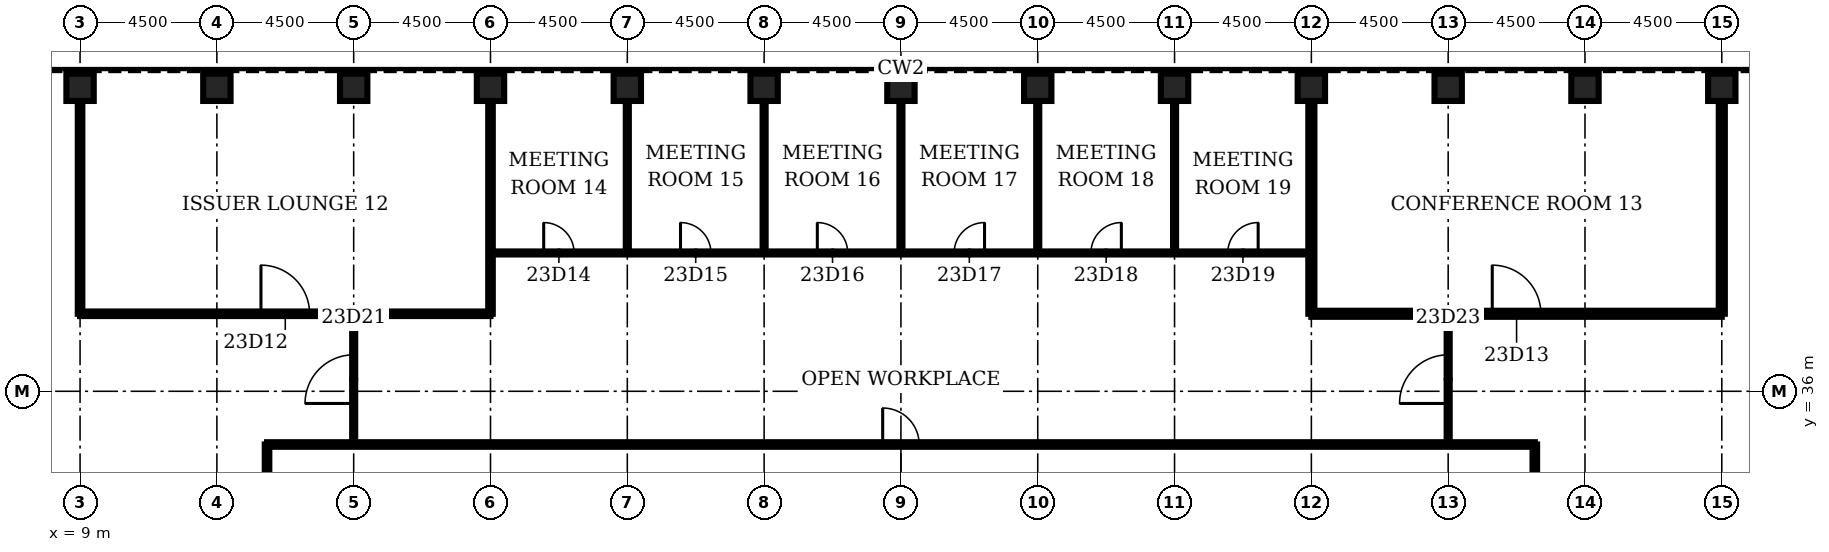
"""IFC4 building model, lengths in metres.
Left out: names, types, materials, properties, quantities, classifications, styles, units other than length and angle.
Written with IfcOpenShell. Run it as: python <this file> out.ifc"""

import sys

from ifc_helpers import new_model, si_unit, direction, frame, frame_2d, origin, origin_2d, place, context, subcontext, project, spatial, rectangle, hollow_rectangle, extrude, element, fill, save


model = new_model("IFC4")
c1 = context("Model", 3, precision=1e-05, world=origin(), true_north=direction((0.0, 1.0)))
c2 = subcontext(c1, "Body", "Model", "MODEL_VIEW")
j1 = project(units=[si_unit("LENGTHUNIT", "METRE"), si_unit("PLANEANGLEUNIT", "RADIAN")], contexts=[c1])
p1 = place(None, origin())
s1 = spatial("IfcSite", under=j1, at=p1, CompositionType="ELEMENT")
p2 = place(p1, origin())
s2 = spatial("IfcBuilding", under=s1, at=p2, CompositionType="ELEMENT")
p3 = place(p2, frame((0.0, 0.0, 108.9)))
s3 = spatial("IfcBuildingStorey", under=s2, at=p3, CompositionType="ELEMENT", Elevation=108.9)
for number, where, z_axis, x_axis in (
    (1, (63.0, 46.0, 0.0), (0.0, 0.0, 1.0), (0.0, 1.0, 0.0)),
    (2, (58.5, 46.0, 0.0), (0.0, 0.0, 1.0), (0.0, 1.0, 0.0)),
    (3, (54.0, 46.0, 0.0), (0.0, 0.0, 1.0), (0.0, 1.0, 0.0)),
    (4, (49.5, 46.0, 0.0), (0.0, 0.0, 1.0), (0.0, 1.0, 0.0)),
    (5, (45.0, 46.0, 0.0), (0.0, 0.0, 1.0), (0.0, 1.0, 0.0)),
    (6, (40.5, 46.0, 0.0), (0.0, 0.0, 1.0), (0.0, 1.0, 0.0)),
    (7, (36.0, 46.0, 0.0), (0.0, 0.0, 1.0), (0.0, 1.0, 0.0)),
    (8, (31.5, 46.0, 0.0), (0.0, 0.0, 1.0), (0.0, 1.0, 0.0)),
    (9, (27.0, 46.0, 0.0), (0.0, 0.0, 1.0), (0.0, 1.0, 0.0)),
    (10, (22.5, 46.0, 0.0), (0.0, 0.0, 1.0), (0.0, 1.0, 0.0)),
    (11, (18.0, 46.0, 0.0), (0.0, 0.0, 1.0), (0.0, 1.0, 0.0)),
    (12, (13.5, 46.0, 0.0), (0.0, 0.0, 1.0), (0.0, 1.0, 0.0)),
    (13, (9.0, 46.0, 0.0), (0.0, 0.0, 1.0), (0.0, 1.0, 0.0)),
):
    element("IfcColumn", number, at=place(p3, frame(where, z_axis=z_axis, x_axis=x_axis)), inside=s3, PredefinedType="COLUMN", context=c2, shape_type="SweptSolid", body=[
        extrude(hollow_rectangle(XDim=0.9, YDim=0.9, WallThickness=0.11, at=origin_2d()), origin(), (0.0, 0.0, 1.0), 4.2),
    ])
p4 = place(p3, frame((15.15, 34.25, 0.0), z_axis=(0.0, 0.0, 1.0), x_axis=(1.0, 0.0, 0.0)))
e14 = element("IfcWall", 14, at=p4, inside=s3, PredefinedType="PARTITIONING", context=c2, shape_type="SweptSolid", body=[
    extrude(rectangle(XDim=41.7, YDim=0.15, at=frame_2d((20.85, 0.0))), origin(), (0.0, 0.0, 1.0), 3.0),
])
p5 = place(p4, frame((20.25, 0.0, 0.0)))
e15 = element("IfcOpeningElement", 15, at=p5, cuts=e14, PredefinedType="OPENING", context=c2, shape_type="SweptSolid", body=[
    extrude(rectangle(XDim=1.2, YDim=2.1, at=frame_2d((0.6, 1.05))), frame((0.0, 0.085, 0.0), z_axis=(0.0, -1.0, 0.0), x_axis=(1.0, 0.0, 0.0)), (0.0, 0.0, 1.0), 0.17),
])
p6 = place(p3, frame((9.0, 38.55, 0.0), z_axis=(0.0, 0.0, 1.0), x_axis=(1.0, 0.0, 0.0)))
e16 = element("IfcWall", 16, at=p6, inside=s3, PredefinedType="PARTITIONING", context=c2, shape_type="SweptSolid", body=[
    extrude(rectangle(XDim=13.5, YDim=0.15, at=frame_2d((6.75, 0.0))), origin(), (0.0, 0.0, 1.0), 3.0),
])
p7 = place(p6, frame((5.95, 0.0, 0.0)))
e17 = element("IfcOpeningElement", 17, at=p7, cuts=e16, PredefinedType="OPENING", context=c2, shape_type="SweptSolid", body=[
    extrude(rectangle(XDim=1.6, YDim=2.1, at=frame_2d((0.8, 1.05))), frame((0.0, 0.085, 0.0), z_axis=(0.0, -1.0, 0.0), x_axis=(1.0, 0.0, 0.0)), (0.0, 0.0, 1.0), 0.17),
])
p8 = place(p3, frame((49.5, 38.55, 0.0), z_axis=(0.0, 0.0, 1.0), x_axis=(1.0, 0.0, 0.0)))
e18 = element("IfcWall", 18, at=p8, inside=s3, PredefinedType="PARTITIONING", context=c2, shape_type="SweptSolid", body=[
    extrude(rectangle(XDim=13.5, YDim=0.2, at=frame_2d((6.75, 0.0))), origin(), (0.0, 0.0, 1.0), 3.0),
])
p9 = place(p8, frame((5.95, 0.0, 0.0)))
e19 = element("IfcOpeningElement", 19, at=p9, cuts=e18, PredefinedType="OPENING", context=c2, shape_type="SweptSolid", body=[
    extrude(rectangle(XDim=1.6, YDim=2.1, at=frame_2d((0.8, 1.05))), frame((0.0, 0.11, 0.0), z_axis=(0.0, -1.0, 0.0), x_axis=(1.0, 0.0, 0.0)), (0.0, 0.0, 1.0), 0.22),
])
p10 = place(p3, frame((22.5, 40.55, 0.0), z_axis=(0.0, 0.0, 1.0), x_axis=(1.0, 0.0, 0.0)))
e20 = element("IfcWall", 20, at=p10, inside=s3, PredefinedType="PARTITIONING", context=c2, shape_type="SweptSolid", body=[
    extrude(rectangle(XDim=27.0, YDim=0.1, at=frame_2d((13.5, 0.0))), origin(), (0.0, 0.0, 1.0), 3.0),
])
p11 = place(p10, frame((1.75, 0.0, 0.0)))
e21 = element("IfcOpeningElement", 21, at=p11, cuts=e20, PredefinedType="OPENING", context=c2, shape_type="SweptSolid", body=[
    extrude(rectangle(XDim=1.0, YDim=2.1, at=frame_2d((0.5, 1.05))), frame((0.0, 0.06, 0.0), z_axis=(0.0, -1.0, 0.0), x_axis=(1.0, 0.0, 0.0)), (0.0, 0.0, 1.0), 0.12),
])
p12 = place(p10, frame((6.25, 0.0, 0.0)))
e22 = element("IfcOpeningElement", 22, at=p12, cuts=e20, PredefinedType="OPENING", context=c2, shape_type="SweptSolid", body=[
    extrude(rectangle(XDim=1.0, YDim=2.1, at=frame_2d((0.5, 1.05))), frame((0.0, 0.06, 0.0), z_axis=(0.0, -1.0, 0.0), x_axis=(1.0, 0.0, 0.0)), (0.0, 0.0, 1.0), 0.12),
])
p13 = place(p10, frame((10.75, 0.0, 0.0)))
e23 = element("IfcOpeningElement", 23, at=p13, cuts=e20, PredefinedType="OPENING", context=c2, shape_type="SweptSolid", body=[
    extrude(rectangle(XDim=1.0, YDim=2.1, at=frame_2d((0.5, 1.05))), frame((0.0, 0.06, 0.0), z_axis=(0.0, -1.0, 0.0), x_axis=(1.0, 0.0, 0.0)), (0.0, 0.0, 1.0), 0.12),
])
p14 = place(p10, frame((15.25, 0.0, 0.0)))
e24 = element("IfcOpeningElement", 24, at=p14, cuts=e20, PredefinedType="OPENING", context=c2, shape_type="SweptSolid", body=[
    extrude(rectangle(XDim=1.0, YDim=2.1, at=frame_2d((0.5, 1.05))), frame((0.0, 0.06, 0.0), z_axis=(0.0, -1.0, 0.0), x_axis=(1.0, 0.0, 0.0)), (0.0, 0.0, 1.0), 0.12),
])
p15 = place(p10, frame((19.75, 0.0, 0.0)))
e25 = element("IfcOpeningElement", 25, at=p15, cuts=e20, PredefinedType="OPENING", context=c2, shape_type="SweptSolid", body=[
    extrude(rectangle(XDim=1.0, YDim=2.1, at=frame_2d((0.5, 1.05))), frame((0.0, 0.06, 0.0), z_axis=(0.0, -1.0, 0.0), x_axis=(1.0, 0.0, 0.0)), (0.0, 0.0, 1.0), 0.12),
])
p16 = place(p10, frame((24.25, 0.0, 0.0)))
e26 = element("IfcOpeningElement", 26, at=p16, cuts=e20, PredefinedType="OPENING", context=c2, shape_type="SweptSolid", body=[
    extrude(rectangle(XDim=1.0, YDim=2.1, at=frame_2d((0.5, 1.05))), frame((0.0, 0.06, 0.0), z_axis=(0.0, -1.0, 0.0), x_axis=(1.0, 0.0, 0.0)), (0.0, 0.0, 1.0), 0.12),
])
p17 = place(p3, frame((9.0, 38.55, 0.0), z_axis=(0.0, 0.0, 1.0), x_axis=(0.0, 1.0, 0.0)))
e27 = element("IfcWall", 27, at=p17, inside=s3, PredefinedType="PARTITIONING", context=c2, shape_type="SweptSolid", body=[
    extrude(rectangle(XDim=7.0, YDim=0.15, at=frame_2d((3.5, 0.0))), origin(), (0.0, 0.0, 1.0), 3.0),
])
p18 = place(p3, frame((15.15, 13.75, 0.0), z_axis=(0.0, 0.0, 1.0), x_axis=(0.0, 1.0, 0.0)))
e28 = element("IfcWall", 28, at=p18, inside=s3, PredefinedType="PARTITIONING", context=c2, shape_type="SweptSolid", body=[
    extrude(rectangle(XDim=20.5, YDim=0.15, at=frame_2d((10.25, 0.0))), origin(), (0.0, 0.0, 1.0), 3.0),
])
p19 = place(p18, frame((9.65, 0.0, 0.0)))
e29 = element("IfcOpeningElement", 29, at=p19, cuts=e28, PredefinedType="OPENING", context=c2, shape_type="SweptSolid", body=[
    extrude(rectangle(XDim=1.2, YDim=2.1, at=frame_2d((0.6, 1.05))), frame((0.0, 0.085, 0.0), z_axis=(0.0, -1.0, 0.0), x_axis=(1.0, 0.0, 0.0)), (0.0, 0.0, 1.0), 0.17),
])
p20 = place(p3, frame((18.0, 34.25, 0.0), z_axis=(0.0, 0.0, 1.0), x_axis=(0.0, 1.0, 0.0)))
e30 = element("IfcWall", 30, at=p20, inside=s3, PredefinedType="PARTITIONING", context=c2, shape_type="SweptSolid", body=[
    extrude(rectangle(XDim=4.3, YDim=0.1, at=frame_2d((2.15, 0.0))), origin(), (0.0, 0.0, 1.0), 3.0),
])
p21 = place(p20, frame((1.35, 0.0, 0.0)))
e31 = element("IfcOpeningElement", 31, at=p21, cuts=e30, PredefinedType="OPENING", context=c2, shape_type="SweptSolid", body=[
    extrude(rectangle(XDim=1.6, YDim=2.1, at=frame_2d((0.8, 1.05))), frame((0.0, 0.06, 0.0), z_axis=(0.0, -1.0, 0.0), x_axis=(1.0, 0.0, 0.0)), (0.0, 0.0, 1.0), 0.12),
])
p22 = place(p3, frame((22.5, 38.55, 0.0), z_axis=(0.0, 0.0, 1.0), x_axis=(0.0, 1.0, 0.0)))
e32 = element("IfcWall", 32, at=p22, inside=s3, PredefinedType="PARTITIONING", context=c2, shape_type="SweptSolid", body=[
    extrude(rectangle(XDim=7.0, YDim=0.15, at=frame_2d((3.5, 0.0))), origin(), (0.0, 0.0, 1.0), 3.0),
])
for number, where, z_axis, x_axis in (
    (33, (27.0, 40.55, 0.0), (0.0, 0.0, 1.0), (0.0, 1.0, 0.0)),
    (34, (31.5, 40.55, 0.0), (0.0, 0.0, 1.0), (0.0, 1.0, 0.0)),
    (35, (36.0, 40.55, 0.0), (0.0, 0.0, 1.0), (0.0, 1.0, 0.0)),
    (36, (40.5, 40.55, 0.0), (0.0, 0.0, 1.0), (0.0, 1.0, 0.0)),
    (37, (45.0, 40.55, 0.0), (0.0, 0.0, 1.0), (0.0, 1.0, 0.0)),
):
    element("IfcWall", number, at=place(p3, frame(where, z_axis=z_axis, x_axis=x_axis)), inside=s3, PredefinedType="PARTITIONING", context=c2, shape_type="SweptSolid", body=[
        extrude(rectangle(XDim=5.0, YDim=0.1, at=frame_2d((2.5, 0.0))), origin(), (0.0, 0.0, 1.0), 3.0),
    ])
p23 = place(p3, frame((49.5, 38.55, 0.0), z_axis=(0.0, 0.0, 1.0), x_axis=(0.0, 1.0, 0.0)))
e38 = element("IfcWall", 38, at=p23, inside=s3, PredefinedType="PARTITIONING", context=c2, shape_type="SweptSolid", body=[
    extrude(rectangle(XDim=7.0, YDim=0.2, at=frame_2d((3.5, 0.0))), origin(), (0.0, 0.0, 1.0), 3.0),
])
p24 = place(p3, frame((54.0, 34.25, 0.0), z_axis=(0.0, 0.0, 1.0), x_axis=(0.0, 1.0, 0.0)))
e39 = element("IfcWall", 39, at=p24, inside=s3, PredefinedType="PARTITIONING", context=c2, shape_type="SweptSolid", body=[
    extrude(rectangle(XDim=4.3, YDim=0.1, at=frame_2d((2.15, 0.0))), origin(), (0.0, 0.0, 1.0), 3.0),
])
p25 = place(p24, frame((1.35, 0.0, 0.0)))
e40 = element("IfcOpeningElement", 40, at=p25, cuts=e39, PredefinedType="OPENING", context=c2, shape_type="SweptSolid", body=[
    extrude(rectangle(XDim=1.6, YDim=2.1, at=frame_2d((0.8, 1.05))), frame((0.0, 0.06, 0.0), z_axis=(0.0, -1.0, 0.0), x_axis=(1.0, 0.0, 0.0)), (0.0, 0.0, 1.0), 0.12),
])
p26 = place(p3, frame((56.85, 13.75, 0.0), z_axis=(0.0, 0.0, 1.0), x_axis=(0.0, 1.0, 0.0)))
e41 = element("IfcWall", 41, at=p26, inside=s3, PredefinedType="PARTITIONING", context=c2, shape_type="SweptSolid", body=[
    extrude(rectangle(XDim=20.5, YDim=0.15, at=frame_2d((10.25, 0.0))), origin(), (0.0, 0.0, 1.0), 3.0),
])
p27 = place(p26, frame((9.65, 0.0, 0.0)))
e42 = element("IfcOpeningElement", 42, at=p27, cuts=e41, PredefinedType="OPENING", context=c2, shape_type="SweptSolid", body=[
    extrude(rectangle(XDim=1.2, YDim=2.1, at=frame_2d((0.6, 1.05))), frame((0.0, 0.085, 0.0), z_axis=(0.0, -1.0, 0.0), x_axis=(1.0, 0.0, 0.0)), (0.0, 0.0, 1.0), 0.17),
])
p28 = place(p3, frame((63.0, 38.55, 0.0), z_axis=(0.0, 0.0, 1.0), x_axis=(0.0, 1.0, 0.0)))
e43 = element("IfcWall", 43, at=p28, inside=s3, PredefinedType="PARTITIONING", context=c2, shape_type="SweptSolid", body=[
    extrude(rectangle(XDim=7.0, YDim=0.2, at=frame_2d((3.5, 0.0))), origin(), (0.0, 0.0, 1.0), 3.0),
])
p29 = place(p7, origin())
e44 = element("IfcDoor", 44, at=p29, inside=s3, OperationType="SINGLE_SWING_LEFT", PredefinedType="DOOR", context=c2, shape_type="SweptSolid", body=[
    extrude(rectangle(XDim=1.6, YDim=2.1, at=frame_2d((0.8, 1.05))), frame((0.0, 0.025, 0.0), z_axis=(0.0, -1.0, 0.0), x_axis=(1.0, 0.0, 0.0)), (0.0, 0.0, 1.0), 0.05),
])
fill(e17, e44)
p30 = place(p9, origin())
e45 = element("IfcDoor", 45, at=p30, inside=s3, OperationType="SINGLE_SWING_LEFT", PredefinedType="DOOR", context=c2, shape_type="SweptSolid", body=[
    extrude(rectangle(XDim=1.6, YDim=2.1, at=frame_2d((0.8, 1.05))), frame((0.0, 0.025, 0.0), z_axis=(0.0, -1.0, 0.0), x_axis=(1.0, 0.0, 0.0)), (0.0, 0.0, 1.0), 0.05),
])
fill(e19, e45)
p31 = place(p11, origin())
e46 = element("IfcDoor", 46, at=p31, inside=s3, OperationType="SINGLE_SWING_LEFT", PredefinedType="DOOR", context=c2, shape_type="SweptSolid", body=[
    extrude(rectangle(XDim=1.0, YDim=2.1, at=frame_2d((0.5, 1.05))), frame((0.0, 0.025, 0.0), z_axis=(0.0, -1.0, 0.0), x_axis=(1.0, 0.0, 0.0)), (0.0, 0.0, 1.0), 0.05),
])
fill(e21, e46)
p32 = place(p12, origin())
e47 = element("IfcDoor", 47, at=p32, inside=s3, OperationType="SINGLE_SWING_LEFT", PredefinedType="DOOR", context=c2, shape_type="SweptSolid", body=[
    extrude(rectangle(XDim=1.0, YDim=2.1, at=frame_2d((0.5, 1.05))), frame((0.0, 0.025, 0.0), z_axis=(0.0, -1.0, 0.0), x_axis=(1.0, 0.0, 0.0)), (0.0, 0.0, 1.0), 0.05),
])
fill(e22, e47)
p33 = place(p13, origin())
e48 = element("IfcDoor", 48, at=p33, inside=s3, OperationType="SINGLE_SWING_LEFT", PredefinedType="DOOR", context=c2, shape_type="SweptSolid", body=[
    extrude(rectangle(XDim=1.0, YDim=2.1, at=frame_2d((0.5, 1.05))), frame((0.0, 0.025, 0.0), z_axis=(0.0, -1.0, 0.0), x_axis=(1.0, 0.0, 0.0)), (0.0, 0.0, 1.0), 0.05),
])
fill(e23, e48)
p34 = place(p14, origin())
e49 = element("IfcDoor", 49, at=p34, inside=s3, OperationType="SINGLE_SWING_RIGHT", PredefinedType="DOOR", context=c2, shape_type="SweptSolid", body=[
    extrude(rectangle(XDim=1.0, YDim=2.1, at=frame_2d((0.5, 1.05))), frame((0.0, 0.025, 0.0), z_axis=(0.0, -1.0, 0.0), x_axis=(1.0, 0.0, 0.0)), (0.0, 0.0, 1.0), 0.05),
])
fill(e24, e49)
p35 = place(p15, origin())
e50 = element("IfcDoor", 50, at=p35, inside=s3, OperationType="SINGLE_SWING_RIGHT", PredefinedType="DOOR", context=c2, shape_type="SweptSolid", body=[
    extrude(rectangle(XDim=1.0, YDim=2.1, at=frame_2d((0.5, 1.05))), frame((0.0, 0.025, 0.0), z_axis=(0.0, -1.0, 0.0), x_axis=(1.0, 0.0, 0.0)), (0.0, 0.0, 1.0), 0.05),
])
fill(e25, e50)
p36 = place(p16, origin())
e51 = element("IfcDoor", 51, at=p36, inside=s3, OperationType="SINGLE_SWING_RIGHT", PredefinedType="DOOR", context=c2, shape_type="SweptSolid", body=[
    extrude(rectangle(XDim=1.0, YDim=2.1, at=frame_2d((0.5, 1.05))), frame((0.0, 0.025, 0.0), z_axis=(0.0, -1.0, 0.0), x_axis=(1.0, 0.0, 0.0)), (0.0, 0.0, 1.0), 0.05),
])
fill(e26, e51)
p37 = place(p21, origin())
e52 = element("IfcDoor", 52, at=p37, inside=s3, OperationType="SINGLE_SWING_LEFT", PredefinedType="DOOR", context=c2, shape_type="SweptSolid", body=[
    extrude(rectangle(XDim=1.6, YDim=2.1, at=frame_2d((0.8, 1.05))), frame((0.0, 0.025, 0.0), z_axis=(0.0, -1.0, 0.0), x_axis=(1.0, 0.0, 0.0)), (0.0, 0.0, 1.0), 0.05),
])
fill(e31, e52)
p38 = place(p25, origin())
e53 = element("IfcDoor", 53, at=p38, inside=s3, OperationType="SINGLE_SWING_LEFT", PredefinedType="DOOR", context=c2, shape_type="SweptSolid", body=[
    extrude(rectangle(XDim=1.6, YDim=2.1, at=frame_2d((0.8, 1.05))), frame((0.0, 0.025, 0.0), z_axis=(0.0, -1.0, 0.0), x_axis=(1.0, 0.0, 0.0)), (0.0, 0.0, 1.0), 0.05),
])
fill(e40, e53)
p39 = place(p5, origin())
e54 = element("IfcDoor", 54, at=p39, inside=s3, OperationType="SINGLE_SWING_LEFT", PredefinedType="DOOR", context=c2, shape_type="SweptSolid", body=[
    extrude(rectangle(XDim=1.2, YDim=2.1, at=frame_2d((0.6, 1.05))), frame((0.0, 0.025, 0.0), z_axis=(0.0, -1.0, 0.0), x_axis=(1.0, 0.0, 0.0)), (0.0, 0.0, 1.0), 0.05),
])
fill(e15, e54)
save(model, sys.argv[1])
